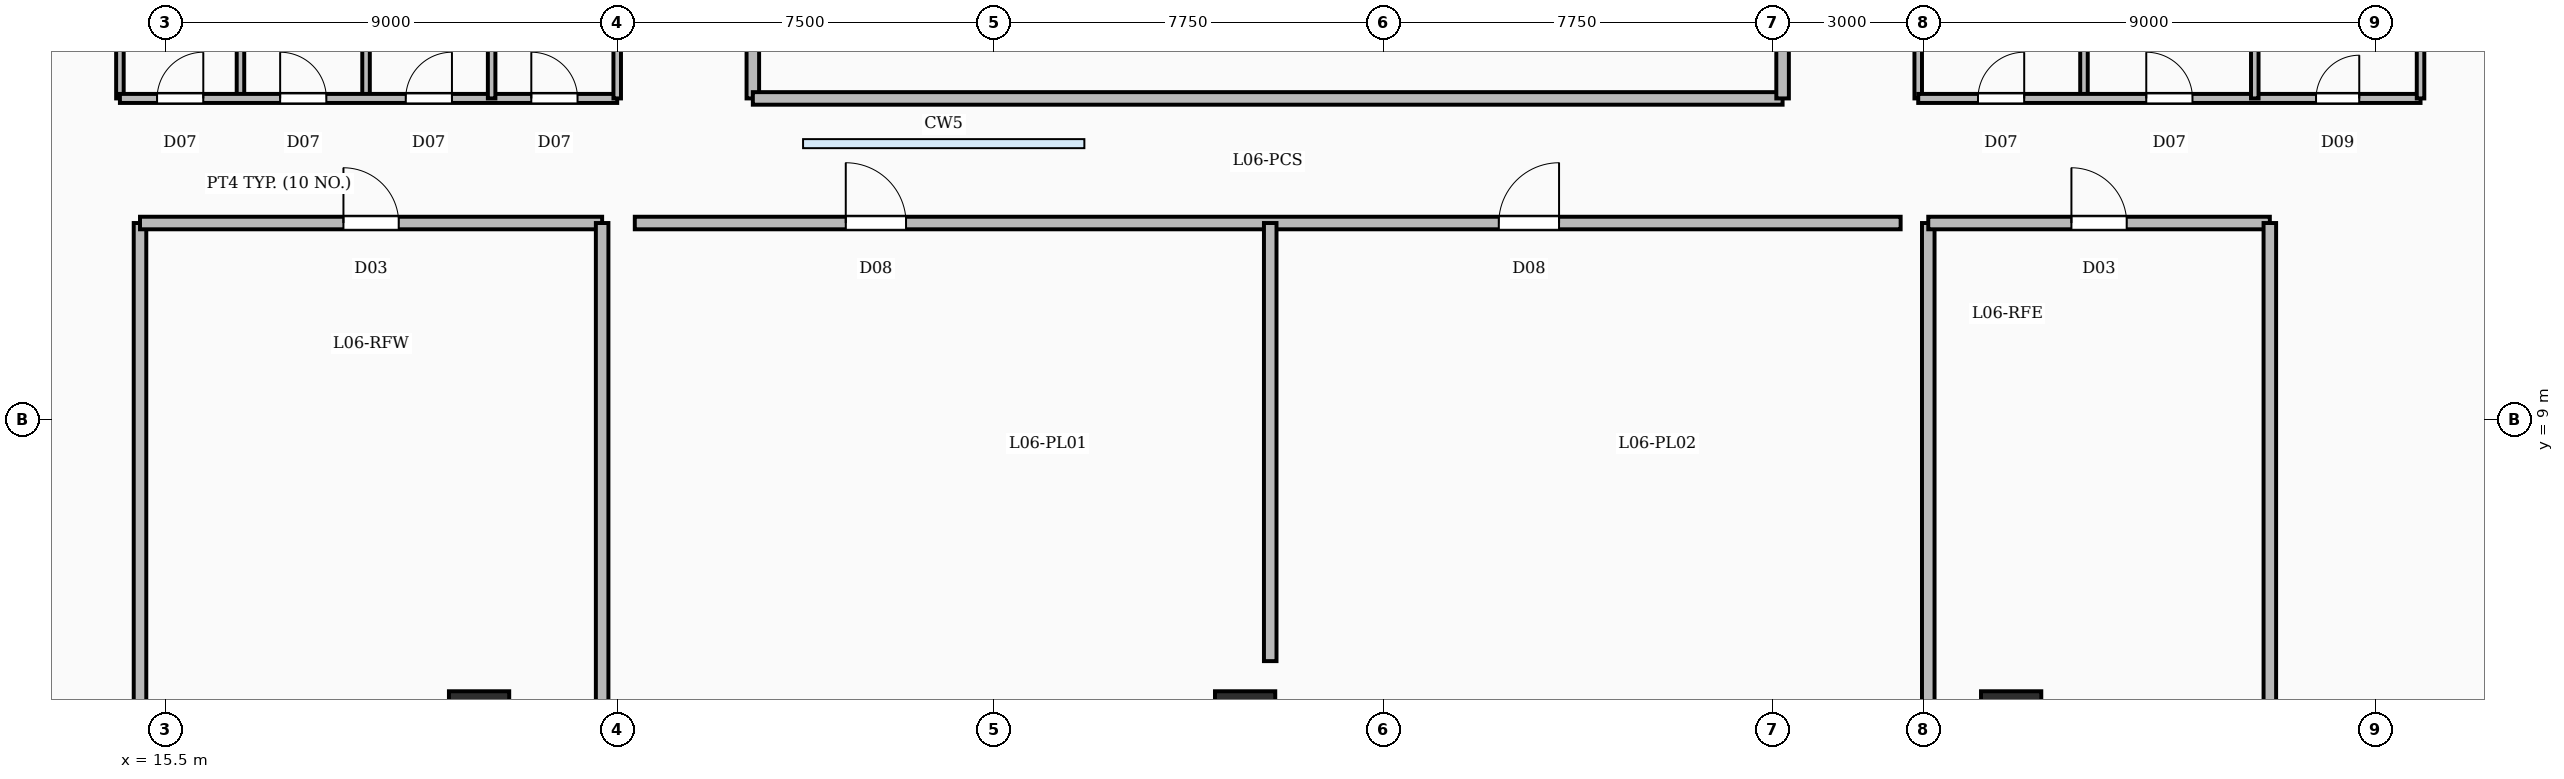
"""IFC4 building model, lengths in metres.
Left out: names, types, materials, properties, quantities, classifications, styles, units other than length and angle.
Written with IfcOpenShell. Run it as: python <this file> out.ifc"""

import sys

from ifc_helpers import new_model, si_unit, direction, frame, frame_2d, origin, origin_2d, place, context, subcontext, project, spatial, rectangle, extrude, element, fill, save


model = new_model("IFC4")
c1 = context("Model", 3, precision=1e-05, world=origin(), true_north=direction((0.0, 1.0)))
c2 = subcontext(c1, "Body", "Model", "MODEL_VIEW")
j1 = project(units=[si_unit("LENGTHUNIT", "METRE"), si_unit("PLANEANGLEUNIT", "RADIAN")], contexts=[c1])
p1 = place(None, origin())
s1 = spatial("IfcSite", under=j1, at=p1, CompositionType="ELEMENT")
p2 = place(p1, origin())
s2 = spatial("IfcBuilding", under=s1, at=p2, CompositionType="ELEMENT")
p3 = place(p2, frame((0.0, 0.0, 34.0)))
s3 = spatial("IfcBuildingStorey", under=s2, at=p3, CompositionType="ELEMENT", Elevation=34.0)
for number, where, z_axis, x_axis in (
    (1, (21.75, 3.15, -0.45), (0.0, 0.0, 1.0), (1.0, 0.0, 0.0)),
    (2, (37.0, 3.15, -0.45), (0.0, 0.0, 1.0), (1.0, 0.0, 0.0)),
    (3, (52.25, 3.15, -0.45), (0.0, 0.0, 1.0), (1.0, 0.0, 0.0)),
):
    element("IfcColumn", number, at=place(p3, frame(where, z_axis=z_axis, x_axis=x_axis)), inside=s3, PredefinedType="COLUMN", context=c2, shape_type="SweptSolid", body=[
        extrude(rectangle(XDim=1.2, YDim=0.9, at=origin_2d()), origin(), (0.0, 0.0, 1.0), 8.0),
    ])
for number, where, z_axis, x_axis in (
    (4, (17.0, 15.4, 0.0), (0.0, 0.0, 1.0), (0.0, 1.0, 0.0)),
    (5, (19.5, 15.4, 0.0), (0.0, 0.0, 1.0), (0.0, 1.0, 0.0)),
    (6, (22.0, 15.4, 0.0), (0.0, 0.0, 1.0), (0.0, 1.0, 0.0)),
):
    element("IfcWall", number, at=place(p3, frame(where, z_axis=z_axis, x_axis=x_axis)), inside=s3, PredefinedType="PARTITIONING", context=c2, shape_type="SweptSolid", body=[
        extrude(rectangle(XDim=3.58, YDim=0.15, at=frame_2d((1.79, 0.0))), origin(), (0.0, 0.0, 1.0), 6.61),
    ])
p4 = place(p3, frame((14.6, 15.4, 0.0), z_axis=(0.0, 0.0, 1.0), x_axis=(1.0, 0.0, 0.0)))
e7 = element("IfcWall", 7, at=p4, inside=s3, PredefinedType="PARTITIONING", context=c2, shape_type="SweptSolid", body=[
    extrude(rectangle(XDim=9.9, YDim=0.18, at=frame_2d((4.95, 0.0))), origin(), (0.0, 0.0, 1.0), 6.61),
])
p5 = place(p4, frame((0.74, 0.0, 0.0)))
e8 = element("IfcOpeningElement", 8, at=p5, cuts=e7, PredefinedType="OPENING", context=c2, shape_type="SweptSolid", body=[
    extrude(rectangle(XDim=0.92, YDim=2.1, at=frame_2d((0.46, 1.05))), frame((0.0, 0.1, 0.0), z_axis=(0.0, -1.0, 0.0), x_axis=(1.0, 0.0, 0.0)), (0.0, 0.0, 1.0), 0.2),
])
p6 = place(p4, frame((3.19, 0.0, 0.0)))
e9 = element("IfcOpeningElement", 9, at=p6, cuts=e7, PredefinedType="OPENING", context=c2, shape_type="SweptSolid", body=[
    extrude(rectangle(XDim=0.92, YDim=2.1, at=frame_2d((0.46, 1.05))), frame((0.0, 0.1, 0.0), z_axis=(0.0, -1.0, 0.0), x_axis=(1.0, 0.0, 0.0)), (0.0, 0.0, 1.0), 0.2),
])
p7 = place(p4, frame((5.69, 0.0, 0.0)))
e10 = element("IfcOpeningElement", 10, at=p7, cuts=e7, PredefinedType="OPENING", context=c2, shape_type="SweptSolid", body=[
    extrude(rectangle(XDim=0.92, YDim=2.1, at=frame_2d((0.46, 1.05))), frame((0.0, 0.1, 0.0), z_axis=(0.0, -1.0, 0.0), x_axis=(1.0, 0.0, 0.0)), (0.0, 0.0, 1.0), 0.2),
])
p8 = place(p4, frame((8.19, 0.0, 0.0)))
e11 = element("IfcOpeningElement", 11, at=p8, cuts=e7, PredefinedType="OPENING", context=c2, shape_type="SweptSolid", body=[
    extrude(rectangle(XDim=0.92, YDim=2.1, at=frame_2d((0.46, 1.05))), frame((0.0, 0.1, 0.0), z_axis=(0.0, -1.0, 0.0), x_axis=(1.0, 0.0, 0.0)), (0.0, 0.0, 1.0), 0.2),
])
p9 = place(p3, frame((14.6, 15.4, 0.0), z_axis=(0.0, 0.0, 1.0), x_axis=(0.0, 1.0, 0.0)))
e12 = element("IfcWall", 12, at=p9, inside=s3, PredefinedType="PARTITIONING", context=c2, shape_type="SweptSolid", body=[
    extrude(rectangle(XDim=3.58, YDim=0.15, at=frame_2d((1.79, 0.0))), origin(), (0.0, 0.0, 1.0), 6.61),
])
p10 = place(p3, frame((24.5, 15.4, 0.0), z_axis=(0.0, 0.0, 1.0), x_axis=(0.0, 1.0, 0.0)))
e13 = element("IfcWall", 13, at=p10, inside=s3, PredefinedType="PARTITIONING", context=c2, shape_type="SweptSolid", body=[
    extrude(rectangle(XDim=3.58, YDim=0.15, at=frame_2d((1.79, 0.0))), origin(), (0.0, 0.0, 1.0), 5.6),
])
for number, where, z_axis, x_axis in (
    (14, (53.7, 15.4, 0.0), (0.0, 0.0, 1.0), (0.0, 1.0, 0.0)),
    (15, (57.1, 15.4, 0.0), (0.0, 0.0, 1.0), (0.0, 1.0, 0.0)),
):
    element("IfcWall", number, at=place(p3, frame(where, z_axis=z_axis, x_axis=x_axis)), inside=s3, PredefinedType="PARTITIONING", context=c2, shape_type="SweptSolid", body=[
        extrude(rectangle(XDim=3.58, YDim=0.15, at=frame_2d((1.79, 0.0))), origin(), (0.0, 0.0, 1.0), 6.61),
    ])
p11 = place(p3, frame((50.4, 15.4, 0.0), z_axis=(0.0, 0.0, 1.0), x_axis=(1.0, 0.0, 0.0)))
e16 = element("IfcWall", 16, at=p11, inside=s3, PredefinedType="SOLIDWALL", context=c2, shape_type="SweptSolid", body=[
    extrude(rectangle(XDim=10.0, YDim=0.18, at=frame_2d((5.0, 0.0))), origin(), (0.0, 0.0, 1.0), 6.61),
])
p12 = place(p11, frame((1.19, 0.0, 0.0)))
e17 = element("IfcOpeningElement", 17, at=p12, cuts=e16, PredefinedType="OPENING", context=c2, shape_type="SweptSolid", body=[
    extrude(rectangle(XDim=0.92, YDim=2.1, at=frame_2d((0.46, 1.05))), frame((0.0, 0.1, 0.0), z_axis=(0.0, -1.0, 0.0), x_axis=(1.0, 0.0, 0.0)), (0.0, 0.0, 1.0), 0.2),
])
p13 = place(p11, frame((4.54, 0.0, 0.0)))
e18 = element("IfcOpeningElement", 18, at=p13, cuts=e16, PredefinedType="OPENING", context=c2, shape_type="SweptSolid", body=[
    extrude(rectangle(XDim=0.92, YDim=2.1, at=frame_2d((0.46, 1.05))), frame((0.0, 0.1, 0.0), z_axis=(0.0, -1.0, 0.0), x_axis=(1.0, 0.0, 0.0)), (0.0, 0.0, 1.0), 0.2),
])
p14 = place(p11, frame((7.92, 0.0, 0.0)))
e19 = element("IfcOpeningElement", 19, at=p14, cuts=e16, PredefinedType="OPENING", context=c2, shape_type="SweptSolid", body=[
    extrude(rectangle(XDim=0.86, YDim=2.05, at=frame_2d((0.43, 1.025))), frame((0.0, 0.1, 0.0), z_axis=(0.0, -1.0, 0.0), x_axis=(1.0, 0.0, 0.0)), (0.0, 0.0, 1.0), 0.2),
])
p15 = place(p3, frame((50.4, 15.4, 0.0), z_axis=(0.0, 0.0, 1.0), x_axis=(0.0, 1.0, 0.0)))
e20 = element("IfcWall", 20, at=p15, inside=s3, PredefinedType="PARTITIONING", context=c2, shape_type="SweptSolid", body=[
    extrude(rectangle(XDim=3.58, YDim=0.15, at=frame_2d((1.79, 0.0))), origin(), (0.0, 0.0, 1.0), 5.6),
])
p16 = place(p3, frame((60.4, 15.4, 0.0), z_axis=(0.0, 0.0, 1.0), x_axis=(0.0, 1.0, 0.0)))
e21 = element("IfcWall", 21, at=p16, inside=s3, PredefinedType="PARTITIONING", context=c2, shape_type="SweptSolid", body=[
    extrude(rectangle(XDim=3.58, YDim=0.15, at=frame_2d((1.79, 0.0))), origin(), (0.0, 0.0, 1.0), 6.61),
])
p17 = place(p3, frame((24.85, 12.92, 0.0), z_axis=(0.0, 0.0, 1.0), x_axis=(1.0, 0.0, 0.0)))
e22 = element("IfcWall", 22, at=p17, inside=s3, PredefinedType="SOLIDWALL", context=c2, shape_type="SweptSolid", body=[
    extrude(rectangle(XDim=25.2, YDim=0.25, at=frame_2d((12.6, 0.0))), origin(), (0.0, 0.0, 1.0), 6.61),
])
p18 = place(p17, frame((4.2, 0.0, 0.0)))
e23 = element("IfcOpeningElement", 23, at=p18, cuts=e22, PredefinedType="OPENING", context=c2, shape_type="SweptSolid", body=[
    extrude(rectangle(XDim=1.2, YDim=2.2, at=frame_2d((0.6, 1.1))), frame((0.0, 0.135, 0.0), z_axis=(0.0, -1.0, 0.0), x_axis=(1.0, 0.0, 0.0)), (0.0, 0.0, 1.0), 0.27),
])
p19 = place(p17, frame((17.2, 0.0, 0.0)))
e24 = element("IfcOpeningElement", 24, at=p19, cuts=e22, PredefinedType="OPENING", context=c2, shape_type="SweptSolid", body=[
    extrude(rectangle(XDim=1.2, YDim=2.2, at=frame_2d((0.6, 1.1))), frame((0.0, 0.135, 0.0), z_axis=(0.0, -1.0, 0.0), x_axis=(1.0, 0.0, 0.0)), (0.0, 0.0, 1.0), 0.27),
])
p20 = place(p3, frame((37.5, 4.2, 0.0), z_axis=(0.0, 0.0, 1.0), x_axis=(0.0, 1.0, 0.0)))
e25 = element("IfcWall", 25, at=p20, inside=s3, PredefinedType="SOLIDWALL", context=c2, shape_type="SweptSolid", body=[
    extrude(rectangle(XDim=8.72, YDim=0.25, at=frame_2d((4.36, 0.0))), origin(), (0.0, 0.0, 1.0), 6.61),
])
p21 = place(p3, frame((27.2, 15.4, 0.0), z_axis=(0.0, 0.0, 1.0), x_axis=(1.0, 0.0, 0.0)))
e26 = element("IfcWall", 26, at=p21, inside=s3, PredefinedType="SOLIDWALL", context=c2, shape_type="SweptSolid", body=[
    extrude(rectangle(XDim=20.5, YDim=0.25, at=frame_2d((10.25, 0.0))), origin(), (0.0, 0.0, 1.0), 6.61),
])
for number, where, z_axis, x_axis in (
    (27, (27.2, 15.4, 0.0), (0.0, 0.0, 1.0), (0.0, 1.0, 0.0)),
    (28, (47.7, 15.4, 0.0), (0.0, 0.0, 1.0), (0.0, 1.0, 0.0)),
):
    element("IfcWall", number, at=place(p3, frame(where, z_axis=z_axis, x_axis=x_axis)), inside=s3, PredefinedType="SOLIDWALL", context=c2, shape_type="SweptSolid", body=[
        extrude(rectangle(XDim=25.5, YDim=0.25, at=frame_2d((12.75, 0.0))), origin(), (0.0, 0.0, 1.0), 6.61),
    ])
p22 = place(p3, frame((15.0, 12.92, 0.0), z_axis=(0.0, 0.0, 1.0), x_axis=(1.0, 0.0, 0.0)))
e29 = element("IfcWall", 29, at=p22, inside=s3, PredefinedType="SOLIDWALL", context=c2, shape_type="SweptSolid", body=[
    extrude(rectangle(XDim=9.2, YDim=0.25, at=frame_2d((4.6, 0.0))), origin(), (0.0, 0.0, 1.0), 6.61),
])
p23 = place(p22, frame((4.05, 0.0, 0.0)))
e30 = element("IfcOpeningElement", 30, at=p23, cuts=e29, PredefinedType="OPENING", context=c2, shape_type="SweptSolid", body=[
    extrude(rectangle(XDim=1.1, YDim=2.15, at=frame_2d((0.55, 1.075))), frame((0.0, 0.135, 0.0), z_axis=(0.0, -1.0, 0.0), x_axis=(1.0, 0.0, 0.0)), (0.0, 0.0, 1.0), 0.27),
])
for number, where, z_axis, x_axis in (
    (31, (15.0, 3.06, 0.0), (0.0, 0.0, 1.0), (0.0, 1.0, 0.0)),
    (32, (24.2, 3.06, 0.0), (0.0, 0.0, 1.0), (0.0, 1.0, 0.0)),
):
    element("IfcWall", number, at=place(p3, frame(where, z_axis=z_axis, x_axis=x_axis)), inside=s3, PredefinedType="SOLIDWALL", context=c2, shape_type="SweptSolid", body=[
        extrude(rectangle(XDim=9.86, YDim=0.25, at=frame_2d((4.93, 0.0))), origin(), (0.0, 0.0, 1.0), 6.61),
    ])
p24 = place(p3, frame((50.6, 12.92, 0.0), z_axis=(0.0, 0.0, 1.0), x_axis=(1.0, 0.0, 0.0)))
e33 = element("IfcWall", 33, at=p24, inside=s3, PredefinedType="SOLIDWALL", context=c2, shape_type="SweptSolid", body=[
    extrude(rectangle(XDim=6.8, YDim=0.25, at=frame_2d((3.4, 0.0))), origin(), (0.0, 0.0, 1.0), 6.61),
])
p25 = place(p24, frame((2.85, 0.0, 0.0)))
e34 = element("IfcOpeningElement", 34, at=p25, cuts=e33, PredefinedType="OPENING", context=c2, shape_type="SweptSolid", body=[
    extrude(rectangle(XDim=1.1, YDim=2.15, at=frame_2d((0.55, 1.075))), frame((0.0, 0.135, 0.0), z_axis=(0.0, -1.0, 0.0), x_axis=(1.0, 0.0, 0.0)), (0.0, 0.0, 1.0), 0.27),
])
for number, where, z_axis, x_axis in (
    (35, (50.6, 3.06, 0.0), (0.0, 0.0, 1.0), (0.0, 1.0, 0.0)),
    (36, (57.4, 3.06, 0.0), (0.0, 0.0, 1.0), (0.0, 1.0, 0.0)),
):
    element("IfcWall", number, at=place(p3, frame(where, z_axis=z_axis, x_axis=x_axis)), inside=s3, PredefinedType="SOLIDWALL", context=c2, shape_type="SweptSolid", body=[
        extrude(rectangle(XDim=9.86, YDim=0.25, at=frame_2d((4.93, 0.0))), origin(), (0.0, 0.0, 1.0), 6.61),
    ])
p26 = place(p5, origin())
e37 = element("IfcDoor", 37, at=p26, inside=s3, OperationType="SINGLE_SWING_RIGHT", PredefinedType="DOOR", context=c2, shape_type="SweptSolid", body=[
    extrude(rectangle(XDim=0.92, YDim=2.1, at=frame_2d((0.46, 1.05))), frame((0.0, 0.025, 0.0), z_axis=(0.0, -1.0, 0.0), x_axis=(1.0, 0.0, 0.0)), (0.0, 0.0, 1.0), 0.05),
])
fill(e8, e37)
p27 = place(p6, origin())
e38 = element("IfcDoor", 38, at=p27, inside=s3, OperationType="SINGLE_SWING_LEFT", PredefinedType="DOOR", context=c2, shape_type="SweptSolid", body=[
    extrude(rectangle(XDim=0.92, YDim=2.1, at=frame_2d((0.46, 1.05))), frame((0.0, 0.025, 0.0), z_axis=(0.0, -1.0, 0.0), x_axis=(1.0, 0.0, 0.0)), (0.0, 0.0, 1.0), 0.05),
])
fill(e9, e38)
p28 = place(p7, origin())
e39 = element("IfcDoor", 39, at=p28, inside=s3, OperationType="SINGLE_SWING_RIGHT", PredefinedType="DOOR", context=c2, shape_type="SweptSolid", body=[
    extrude(rectangle(XDim=0.92, YDim=2.1, at=frame_2d((0.46, 1.05))), frame((0.0, 0.025, 0.0), z_axis=(0.0, -1.0, 0.0), x_axis=(1.0, 0.0, 0.0)), (0.0, 0.0, 1.0), 0.05),
])
fill(e10, e39)
p29 = place(p8, origin())
e40 = element("IfcDoor", 40, at=p29, inside=s3, OperationType="SINGLE_SWING_LEFT", PredefinedType="DOOR", context=c2, shape_type="SweptSolid", body=[
    extrude(rectangle(XDim=0.92, YDim=2.1, at=frame_2d((0.46, 1.05))), frame((0.0, 0.025, 0.0), z_axis=(0.0, -1.0, 0.0), x_axis=(1.0, 0.0, 0.0)), (0.0, 0.0, 1.0), 0.05),
])
fill(e11, e40)
p30 = place(p12, origin())
e41 = element("IfcDoor", 41, at=p30, inside=s3, OperationType="SINGLE_SWING_RIGHT", PredefinedType="DOOR", context=c2, shape_type="SweptSolid", body=[
    extrude(rectangle(XDim=0.92, YDim=2.1, at=frame_2d((0.46, 1.05))), frame((0.0, 0.025, 0.0), z_axis=(0.0, -1.0, 0.0), x_axis=(1.0, 0.0, 0.0)), (0.0, 0.0, 1.0), 0.05),
])
fill(e17, e41)
p31 = place(p13, origin())
e42 = element("IfcDoor", 42, at=p31, inside=s3, OperationType="SINGLE_SWING_LEFT", PredefinedType="DOOR", context=c2, shape_type="SweptSolid", body=[
    extrude(rectangle(XDim=0.92, YDim=2.1, at=frame_2d((0.46, 1.05))), frame((0.0, 0.025, 0.0), z_axis=(0.0, -1.0, 0.0), x_axis=(1.0, 0.0, 0.0)), (0.0, 0.0, 1.0), 0.05),
])
fill(e18, e42)
p32 = place(p14, origin())
e43 = element("IfcDoor", 43, at=p32, inside=s3, OperationType="SINGLE_SWING_RIGHT", PredefinedType="DOOR", context=c2, shape_type="SweptSolid", body=[
    extrude(rectangle(XDim=0.86, YDim=2.05, at=frame_2d((0.43, 1.025))), frame((0.0, 0.025, 0.0), z_axis=(0.0, -1.0, 0.0), x_axis=(1.0, 0.0, 0.0)), (0.0, 0.0, 1.0), 0.05),
])
fill(e19, e43)
p33 = place(p18, origin())
e44 = element("IfcDoor", 44, at=p33, inside=s3, OperationType="SINGLE_SWING_LEFT", PredefinedType="DOOR", context=c2, shape_type="SweptSolid", body=[
    extrude(rectangle(XDim=1.2, YDim=2.2, at=frame_2d((0.6, 1.1))), frame((0.0, 0.025, 0.0), z_axis=(0.0, -1.0, 0.0), x_axis=(1.0, 0.0, 0.0)), (0.0, 0.0, 1.0), 0.05),
])
fill(e23, e44)
p34 = place(p19, origin())
e45 = element("IfcDoor", 45, at=p34, inside=s3, OperationType="SINGLE_SWING_RIGHT", PredefinedType="DOOR", context=c2, shape_type="SweptSolid", body=[
    extrude(rectangle(XDim=1.2, YDim=2.2, at=frame_2d((0.6, 1.1))), frame((0.0, 0.025, 0.0), z_axis=(0.0, -1.0, 0.0), x_axis=(1.0, 0.0, 0.0)), (0.0, 0.0, 1.0), 0.05),
])
fill(e24, e45)
p35 = place(p23, origin())
e46 = element("IfcDoor", 46, at=p35, inside=s3, OperationType="SINGLE_SWING_LEFT", PredefinedType="DOOR", context=c2, shape_type="SweptSolid", body=[
    extrude(rectangle(XDim=1.1, YDim=2.15, at=frame_2d((0.55, 1.075))), frame((0.0, 0.025, 0.0), z_axis=(0.0, -1.0, 0.0), x_axis=(1.0, 0.0, 0.0)), (0.0, 0.0, 1.0), 0.05),
])
fill(e30, e46)
p36 = place(p25, origin())
e47 = element("IfcDoor", 47, at=p36, inside=s3, OperationType="SINGLE_SWING_LEFT", PredefinedType="DOOR", context=c2, shape_type="SweptSolid", body=[
    extrude(rectangle(XDim=1.1, YDim=2.15, at=frame_2d((0.55, 1.075))), frame((0.0, 0.025, 0.0), z_axis=(0.0, -1.0, 0.0), x_axis=(1.0, 0.0, 0.0)), (0.0, 0.0, 1.0), 0.05),
])
fill(e34, e47)
save(model, sys.argv[1])
